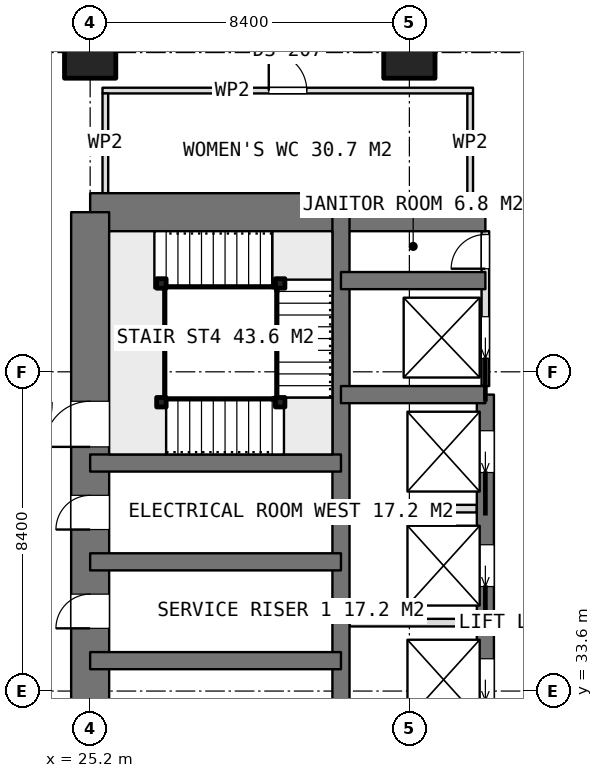
"""IFC4 building model, lengths in metres.
Left out: names, types, materials, properties, quantities, classifications, styles, units other than length and angle.
Written with IfcOpenShell. Run it as: python <this file> out.ifc"""

import sys

from ifc_helpers import new_model, si_unit, direction, frame, frame_2d, origin, origin_2d, place, context, subcontext, project, spatial, rectangle, extrude, element, fill, save


model = new_model("IFC4")
c1 = context("Model", 3, precision=1e-05, world=origin(), true_north=direction((0.0, 1.0)))
c2 = subcontext(c1, "Body", "Model", "MODEL_VIEW")
j1 = project(units=[si_unit("LENGTHUNIT", "METRE"), si_unit("PLANEANGLEUNIT", "RADIAN")], contexts=[c1])
p1 = place(None, origin())
s1 = spatial("IfcSite", under=j1, at=p1, CompositionType="ELEMENT")
p2 = place(p1, origin())
s2 = spatial("IfcBuilding", under=s1, at=p2, CompositionType="ELEMENT")
p3 = place(p2, frame((0.0, 0.0, 195.2)))
s3 = spatial("IfcBuildingStorey", under=s2, at=p3, CompositionType="ELEMENT", Elevation=195.2)
p4 = place(p3, frame((25.2, 46.2, 0.0), z_axis=(0.0, 0.0, 1.0), x_axis=(1.0, 0.0, 0.0)))
e1 = element("IfcWall", 1, at=p4, inside=s3, PredefinedType="SHEAR", context=c2, shape_type="SweptSolid", body=[
    extrude(rectangle(XDim=10.4, YDim=1.0, at=frame_2d((5.2, 0.0))), origin(), (0.0, 0.0, 1.0), 3.75),
])
p5 = place(p3, frame((25.2, 21.0, 0.0), z_axis=(0.0, 0.0, 1.0), x_axis=(0.0, 1.0, 0.0)))
e2 = element("IfcWall", 2, at=p5, inside=s3, PredefinedType="SHEAR", context=c2, shape_type="SweptSolid", body=[
    extrude(rectangle(XDim=25.2, YDim=1.0, at=frame_2d((12.6, 0.0))), origin(), (0.0, 0.0, 1.0), 3.75),
])
p6 = place(p5, frame((7.8, 0.0, 0.0)))
e3 = element("IfcOpeningElement", 3, at=p6, cuts=e2, PredefinedType="OPENING", context=c2, shape_type="SweptSolid", body=[
    extrude(rectangle(XDim=1.2, YDim=2.1, at=frame_2d((0.6, 1.05))), frame((0.0, 0.51, 0.0), z_axis=(0.0, -1.0, 0.0), x_axis=(1.0, 0.0, 0.0)), (0.0, 0.0, 1.0), 1.02),
])
p7 = place(p5, frame((14.25, 0.0, 0.0)))
e4 = element("IfcOpeningElement", 4, at=p7, cuts=e2, PredefinedType="OPENING", context=c2, shape_type="SweptSolid", body=[
    extrude(rectangle(XDim=0.9, YDim=2.1, at=frame_2d((0.45, 1.05))), frame((0.0, 0.51, 0.0), z_axis=(0.0, -1.0, 0.0), x_axis=(1.0, 0.0, 0.0)), (0.0, 0.0, 1.0), 1.02),
])
p8 = place(p5, frame((16.85, 0.0, 0.0)))
e5 = element("IfcOpeningElement", 5, at=p8, cuts=e2, PredefinedType="OPENING", context=c2, shape_type="SweptSolid", body=[
    extrude(rectangle(XDim=0.9, YDim=2.1, at=frame_2d((0.45, 1.05))), frame((0.0, 0.51, 0.0), z_axis=(0.0, -1.0, 0.0), x_axis=(1.0, 0.0, 0.0)), (0.0, 0.0, 1.0), 1.02),
])
p9 = place(p5, frame((19.025, 0.0, 0.0)))
e6 = element("IfcOpeningElement", 6, at=p9, cuts=e2, PredefinedType="OPENING", context=c2, shape_type="SweptSolid", body=[
    extrude(rectangle(XDim=1.2, YDim=2.1, at=frame_2d((0.6, 1.05))), frame((0.0, 0.51, 0.0), z_axis=(0.0, -1.0, 0.0), x_axis=(1.0, 0.0, 0.0)), (0.0, 0.0, 1.0), 1.02),
])
p10 = place(p3, frame((31.8, 21.0, 0.0), z_axis=(0.0, 0.0, 1.0), x_axis=(0.0, 1.0, 0.0)))
e7 = element("IfcWall", 7, at=p10, inside=s3, PredefinedType="SHEAR", context=c2, shape_type="SweptSolid", body=[
    extrude(rectangle(XDim=25.2, YDim=0.45, at=frame_2d((12.6, 0.0))), origin(), (0.0, 0.0, 1.0), 3.75),
])
p11 = place(p3, frame((35.6, 23.4, 0.0), z_axis=(0.0, 0.0, 1.0), x_axis=(0.0, 1.0, 0.0)))
e8 = element("IfcWall", 8, at=p11, inside=s3, PredefinedType="SHEAR", context=c2, shape_type="SweptSolid", body=[
    extrude(rectangle(XDim=18.0, YDim=0.45, at=frame_2d((9.0, 0.0))), origin(), (0.0, 0.0, 1.0), 3.75),
])
p12 = place(p11, frame((0.95, 0.0, 0.0)))
e9 = element("IfcOpeningElement", 9, at=p12, cuts=e8, PredefinedType="OPENING", context=c2, shape_type="SweptSolid", body=[
    extrude(rectangle(XDim=1.1, YDim=2.1, at=frame_2d((0.55, 1.05))), frame((0.0, 0.235, 0.0), z_axis=(0.0, -1.0, 0.0), x_axis=(1.0, 0.0, 0.0)), (0.0, 0.0, 1.0), 0.47),
])
p13 = place(p11, frame((3.95, 0.0, 0.0)))
e10 = element("IfcOpeningElement", 10, at=p13, cuts=e8, PredefinedType="OPENING", context=c2, shape_type="SweptSolid", body=[
    extrude(rectangle(XDim=1.1, YDim=2.1, at=frame_2d((0.55, 1.05))), frame((0.0, 0.235, 0.0), z_axis=(0.0, -1.0, 0.0), x_axis=(1.0, 0.0, 0.0)), (0.0, 0.0, 1.0), 0.47),
])
p14 = place(p11, frame((6.95, 0.0, 0.0)))
e11 = element("IfcOpeningElement", 11, at=p14, cuts=e8, PredefinedType="OPENING", context=c2, shape_type="SweptSolid", body=[
    extrude(rectangle(XDim=1.1, YDim=2.1, at=frame_2d((0.55, 1.05))), frame((0.0, 0.235, 0.0), z_axis=(0.0, -1.0, 0.0), x_axis=(1.0, 0.0, 0.0)), (0.0, 0.0, 1.0), 0.47),
])
p15 = place(p11, frame((9.95, 0.0, 0.0)))
e12 = element("IfcOpeningElement", 12, at=p15, cuts=e8, PredefinedType="OPENING", context=c2, shape_type="SweptSolid", body=[
    extrude(rectangle(XDim=1.1, YDim=2.1, at=frame_2d((0.55, 1.05))), frame((0.0, 0.235, 0.0), z_axis=(0.0, -1.0, 0.0), x_axis=(1.0, 0.0, 0.0)), (0.0, 0.0, 1.0), 0.47),
])
p16 = place(p11, frame((12.95, 0.0, 0.0)))
e13 = element("IfcOpeningElement", 13, at=p16, cuts=e8, PredefinedType="OPENING", context=c2, shape_type="SweptSolid", body=[
    extrude(rectangle(XDim=1.1, YDim=2.1, at=frame_2d((0.55, 1.05))), frame((0.0, 0.235, 0.0), z_axis=(0.0, -1.0, 0.0), x_axis=(1.0, 0.0, 0.0)), (0.0, 0.0, 1.0), 0.47),
])
p17 = place(p11, frame((15.95, 0.0, 0.0)))
e14 = element("IfcOpeningElement", 14, at=p17, cuts=e8, PredefinedType="OPENING", context=c2, shape_type="SweptSolid", body=[
    extrude(rectangle(XDim=1.1, YDim=2.1, at=frame_2d((0.55, 1.05))), frame((0.0, 0.235, 0.0), z_axis=(0.0, -1.0, 0.0), x_axis=(1.0, 0.0, 0.0)), (0.0, 0.0, 1.0), 0.47),
])
for number, where, z_axis, x_axis in (
    (15, (31.8, 41.4, 0.0), (0.0, 0.0, 1.0), (1.0, 0.0, 0.0)),
    (16, (31.8, 44.4, 0.0), (0.0, 0.0, 1.0), (1.0, 0.0, 0.0)),
):
    element("IfcWall", number, at=place(p3, frame(where, z_axis=z_axis, x_axis=x_axis)), inside=s3, PredefinedType="SHEAR", context=c2, shape_type="SweptSolid", body=[
        extrude(rectangle(XDim=3.8, YDim=0.45, at=frame_2d((1.9, 0.0))), origin(), (0.0, 0.0, 1.0), 3.75),
    ])
for number, where, z_axis, x_axis in (
    (17, (25.2, 34.4, 0.0), (0.0, 0.0, 1.0), (1.0, 0.0, 0.0)),
    (18, (25.2, 37.0, 0.0), (0.0, 0.0, 1.0), (1.0, 0.0, 0.0)),
    (19, (25.2, 39.6, 0.0), (0.0, 0.0, 1.0), (1.0, 0.0, 0.0)),
):
    element("IfcWall", number, at=place(p3, frame(where, z_axis=z_axis, x_axis=x_axis)), inside=s3, PredefinedType="SHEAR", context=c2, shape_type="SweptSolid", body=[
        extrude(rectangle(XDim=6.6, YDim=0.45, at=frame_2d((3.3, 0.0))), origin(), (0.0, 0.0, 1.0), 3.75),
    ])
for number, where, z_axis, x_axis in (
    (20, (25.2, 50.4, 0.0), (0.0, 0.0, 1.0), (1.0, 0.0, 0.0)),
    (21, (33.6, 50.4, 0.0), (0.0, 0.0, 1.0), (1.0, 0.0, 0.0)),
):
    element("IfcColumn", number, at=place(p3, frame(where, z_axis=z_axis, x_axis=x_axis)), inside=s3, PredefinedType="COLUMN", context=c2, shape_type="SweptSolid", body=[
        extrude(rectangle(XDim=1.35, YDim=1.35, at=origin_2d()), origin(), (0.0, 0.0, 1.0), 3.75),
    ])
for number, where, z_axis, x_axis in (
    (22, (32.025, 35.4, 0.0), (0.0, 0.0, 1.0), (1.0, 0.0, 0.0)),
    (23, (32.025, 38.4, 0.0), (0.0, 0.0, 1.0), (1.0, 0.0, 0.0)),
):
    element("IfcWall", number, at=place(p3, frame(where, z_axis=z_axis, x_axis=x_axis)), inside=s3, PredefinedType="PARTITIONING", context=c2, shape_type="SweptSolid", body=[
        extrude(rectangle(XDim=3.35, YDim=0.2, at=frame_2d((1.675, 0.0))), origin(), (0.0, 0.0, 1.0), 3.5),
    ])
p18 = place(p3, frame((35.6, 41.625, 0.0), z_axis=(0.0, 0.0, 1.0), x_axis=(0.0, 1.0, 0.0)))
e24 = element("IfcWall", 24, at=p18, inside=s3, PredefinedType="PARTITIONING", context=c2, shape_type="SweptSolid", body=[
    extrude(rectangle(XDim=4.075, YDim=0.2, at=frame_2d((2.038, 0.0))), origin(), (0.0, 0.0, 1.0), 3.5),
])
p19 = place(p18, frame((3.088, 0.0, 0.0)))
e25 = element("IfcOpeningElement", 25, at=p19, cuts=e24, PredefinedType="OPENING", context=c2, shape_type="SweptSolid", body=[
    extrude(rectangle(XDim=0.9, YDim=2.1, at=frame_2d((0.45, 1.05))), frame((0.0, 0.11, 0.0), z_axis=(0.0, -1.0, 0.0), x_axis=(1.0, 0.0, 0.0)), (0.0, 0.0, 1.0), 0.22),
])
p20 = place(p18, frame((0.725, 0.0, 0.0)))
e26 = element("IfcOpeningElement", 26, at=p20, cuts=e24, PredefinedType="OPENING", context=c2, shape_type="SweptSolid", body=[
    extrude(rectangle(XDim=1.1, YDim=2.1, at=frame_2d((0.55, 1.05))), frame((0.0, 0.11, 0.0), z_axis=(0.0, -1.0, 0.0), x_axis=(1.0, 0.0, 0.0)), (0.0, 0.0, 1.0), 0.22),
])
p21 = place(p3, frame((25.525, 49.4, 0.0), z_axis=(0.0, 0.0, 1.0), x_axis=(1.0, 0.0, 0.0)))
e27 = element("IfcWall", 27, at=p21, inside=s3, PredefinedType="PARTITIONING", context=c2, shape_type="SweptSolid", body=[
    extrude(rectangle(XDim=9.75, YDim=0.15, at=frame_2d((4.875, 0.0))), origin(), (0.0, 0.0, 1.0), 3.5),
])
p22 = place(p21, frame((4.375, 0.0, 0.0)))
e28 = element("IfcOpeningElement", 28, at=p22, cuts=e27, PredefinedType="OPENING", context=c2, shape_type="SweptSolid", body=[
    extrude(rectangle(XDim=1.0, YDim=2.1, at=frame_2d((0.5, 1.05))), frame((0.0, 0.085, 0.0), z_axis=(0.0, -1.0, 0.0), x_axis=(1.0, 0.0, 0.0)), (0.0, 0.0, 1.0), 0.17),
])
for number, where, z_axis, x_axis in (
    (29, (25.6, 46.7, 0.0), (0.0, 0.0, 1.0), (0.0, 1.0, 0.0)),
    (30, (35.2, 46.7, 0.0), (0.0, 0.0, 1.0), (0.0, 1.0, 0.0)),
):
    element("IfcWall", number, at=place(p3, frame(where, z_axis=z_axis, x_axis=x_axis)), inside=s3, PredefinedType="PARTITIONING", context=c2, shape_type="SweptSolid", body=[
        extrude(rectangle(XDim=2.625, YDim=0.15, at=frame_2d((1.312, 0.0))), origin(), (0.0, 0.0, 1.0), 3.5),
    ])
for number, where, z_axis, x_axis in (
    (31, (27.075, 41.2, 0.0), (0.0, 0.0, 1.0), (1.0, 0.0, 0.0)),
    (32, (30.2, 41.2, 0.0), (0.0, 0.0, 1.0), (1.0, 0.0, 0.0)),
    (33, (30.2, 44.325, 0.0), (0.0, 0.0, 1.0), (1.0, 0.0, 0.0)),
    (34, (27.075, 44.325, 0.0), (0.0, 0.0, 1.0), (1.0, 0.0, 0.0)),
):
    element("IfcColumn", number, at=place(p3, frame(where, z_axis=z_axis, x_axis=x_axis)), inside=s3, PredefinedType="COLUMN", context=c2, shape_type="SweptSolid", body=[
        extrude(rectangle(XDim=0.25, YDim=0.25, at=origin_2d()), origin(), (0.0, 0.0, 1.0), 3.75),
    ])
p23 = place(p7, origin())
e35 = element("IfcDoor", 35, at=p23, inside=s3, OperationType="SINGLE_SWING_LEFT", PredefinedType="DOOR", context=c2, shape_type="SweptSolid", body=[
    extrude(rectangle(XDim=0.9, YDim=2.1, at=frame_2d((0.45, 1.05))), frame((0.0, 0.025, 0.0), z_axis=(0.0, -1.0, 0.0), x_axis=(1.0, 0.0, 0.0)), (0.0, 0.0, 1.0), 0.05),
])
fill(e4, e35)
p24 = place(p8, origin())
e36 = element("IfcDoor", 36, at=p24, inside=s3, OperationType="SINGLE_SWING_LEFT", PredefinedType="DOOR", context=c2, shape_type="SweptSolid", body=[
    extrude(rectangle(XDim=0.9, YDim=2.1, at=frame_2d((0.45, 1.05))), frame((0.0, 0.025, 0.0), z_axis=(0.0, -1.0, 0.0), x_axis=(1.0, 0.0, 0.0)), (0.0, 0.0, 1.0), 0.05),
])
fill(e5, e36)
p25 = place(p19, origin())
e37 = element("IfcDoor", 37, at=p25, inside=s3, OperationType="SINGLE_SWING_LEFT", PredefinedType="DOOR", context=c2, shape_type="SweptSolid", body=[
    extrude(rectangle(XDim=0.9, YDim=2.1, at=frame_2d((0.45, 1.05))), frame((0.0, 0.025, 0.0), z_axis=(0.0, -1.0, 0.0), x_axis=(1.0, 0.0, 0.0)), (0.0, 0.0, 1.0), 0.05),
])
fill(e25, e37)
p26 = place(p15, origin())
e38 = element("IfcDoor", 38, at=p26, inside=s3, OperationType="SLIDING_TO_LEFT", PredefinedType="USERDEFINED", context=c2, shape_type="SweptSolid", body=[
    extrude(rectangle(XDim=1.1, YDim=2.1, at=frame_2d((0.55, 1.05))), frame((0.0, 0.025, 0.0), z_axis=(0.0, -1.0, 0.0), x_axis=(1.0, 0.0, 0.0)), (0.0, 0.0, 1.0), 0.05),
])
fill(e12, e38)
p27 = place(p16, origin())
e39 = element("IfcDoor", 39, at=p27, inside=s3, OperationType="SLIDING_TO_LEFT", PredefinedType="USERDEFINED", context=c2, shape_type="SweptSolid", body=[
    extrude(rectangle(XDim=1.1, YDim=2.1, at=frame_2d((0.55, 1.05))), frame((0.0, 0.025, 0.0), z_axis=(0.0, -1.0, 0.0), x_axis=(1.0, 0.0, 0.0)), (0.0, 0.0, 1.0), 0.05),
])
fill(e13, e39)
p28 = place(p17, origin())
e40 = element("IfcDoor", 40, at=p28, inside=s3, OperationType="SLIDING_TO_LEFT", PredefinedType="USERDEFINED", context=c2, shape_type="SweptSolid", body=[
    extrude(rectangle(XDim=1.1, YDim=2.1, at=frame_2d((0.55, 1.05))), frame((0.0, 0.025, 0.0), z_axis=(0.0, -1.0, 0.0), x_axis=(1.0, 0.0, 0.0)), (0.0, 0.0, 1.0), 0.05),
])
fill(e14, e40)
p29 = place(p20, origin())
e41 = element("IfcDoor", 41, at=p29, inside=s3, OperationType="SLIDING_TO_LEFT", PredefinedType="USERDEFINED", context=c2, shape_type="SweptSolid", body=[
    extrude(rectangle(XDim=1.1, YDim=2.1, at=frame_2d((0.55, 1.05))), frame((0.0, 0.025, 0.0), z_axis=(0.0, -1.0, 0.0), x_axis=(1.0, 0.0, 0.0)), (0.0, 0.0, 1.0), 0.05),
])
fill(e26, e41)
p30 = place(p22, origin())
e42 = element("IfcDoor", 42, at=p30, inside=s3, OperationType="SINGLE_SWING_LEFT", PredefinedType="DOOR", context=c2, shape_type="SweptSolid", body=[
    extrude(rectangle(XDim=1.0, YDim=2.1, at=frame_2d((0.5, 1.05))), frame((0.0, 0.025, 0.0), z_axis=(0.0, -1.0, 0.0), x_axis=(1.0, 0.0, 0.0)), (0.0, 0.0, 1.0), 0.05),
])
fill(e28, e42)
p31 = place(p9, origin())
e43 = element("IfcDoor", 43, at=p31, inside=s3, OperationType="SINGLE_SWING_RIGHT", PredefinedType="DOOR", context=c2, shape_type="SweptSolid", body=[
    extrude(rectangle(XDim=1.2, YDim=2.1, at=frame_2d((0.6, 1.05))), frame((0.0, 0.025, 0.0), z_axis=(0.0, -1.0, 0.0), x_axis=(1.0, 0.0, 0.0)), (0.0, 0.0, 1.0), 0.05),
])
fill(e6, e43)
save(model, sys.argv[1])
